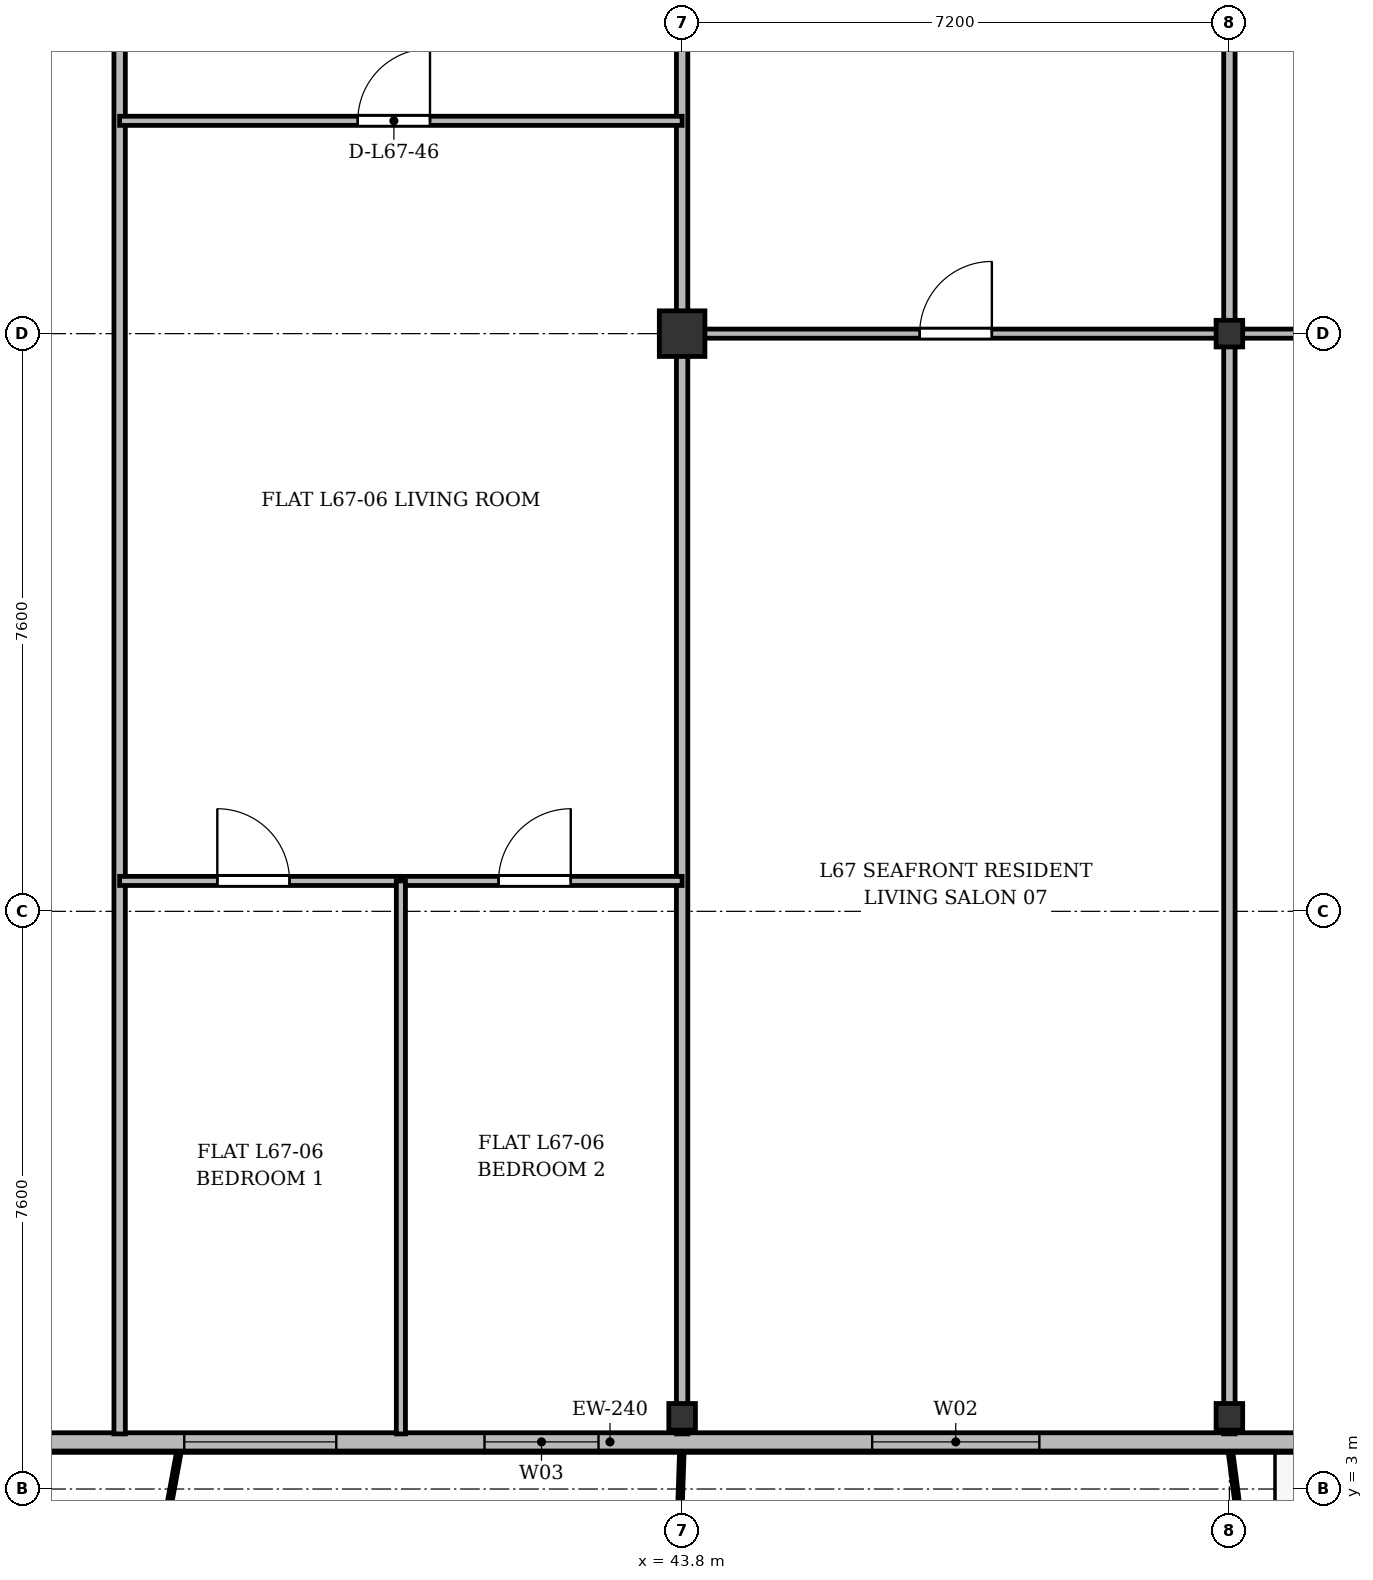
"""IFC4 building model, lengths in metres.
Left out: names, types, materials, properties, quantities, classifications, styles, units other than length and angle.
Written with IfcOpenShell. Run it as: python <this file> out.ifc"""

import sys

from ifc_helpers import new_model, si_unit, direction, frame, frame_2d, origin, origin_2d, place, context, subcontext, project, spatial, rectangle, i_section, extrude, source, transform, mapped, element, fill, save


model = new_model("IFC4")
c1 = context("Model", 3, precision=1e-05, world=origin(), true_north=direction((0.0, 1.0)))
c2 = subcontext(c1, "Body", "Model", "MODEL_VIEW")
j1 = project(units=[si_unit("LENGTHUNIT", "METRE"), si_unit("PLANEANGLEUNIT", "RADIAN")], contexts=[c1])
p1 = place(None, origin())
s1 = spatial("IfcSite", under=j1, at=p1, CompositionType="ELEMENT")
p2 = place(p1, origin())
s2 = spatial("IfcBuilding", under=s1, at=p2, CompositionType="ELEMENT")
p3 = place(p2, frame((0.0, 0.0, 259.5)))
s3 = spatial("IfcBuildingStorey", under=s2, at=p3, CompositionType="ELEMENT", Elevation=259.5)
m1 = source(origin(), c2, "Body", "SweptSolid", [
    extrude(i_section(OverallWidth=0.35, OverallDepth=0.35, WebThickness=0.018, FlangeThickness=0.028, at=origin_2d()), origin(), (0.0, 0.0, 1.0), 3.6),
])
p4 = place(p3, frame((43.8, 3.95, 0.0), z_axis=(0.0, 0.0, 1.0), x_axis=(1.0, 0.0, 0.0)))
e1 = element("IfcColumn", 1, at=p4, inside=s3, PredefinedType="COLUMN", context=c2, shape_type="MappedRepresentation", body=[
    mapped(m1, transform((0.0, 0.0, 0.0), x_axis=(1.0, 0.0, 0.0), y_axis=(0.0, 1.0, 0.0), z_axis=(0.0, 0.0, 1.0), scale=1.0)),
])
m2 = source(origin(), c2, "Body", "SweptSolid", [
    extrude(rectangle(XDim=0.6, YDim=0.6, at=origin_2d()), origin(), (0.0, 0.0, 1.0), 3.6),
])
p5 = place(p3, frame((43.8, 18.2, 0.0), z_axis=(0.0, 0.0, 1.0), x_axis=(1.0, 0.0, 0.0)))
e2 = element("IfcColumn", 2, at=p5, inside=s3, PredefinedType="COLUMN", context=c2, shape_type="MappedRepresentation", body=[
    mapped(m2, transform((0.0, 0.0, 0.0), x_axis=(1.0, 0.0, 0.0), y_axis=(0.0, 1.0, 0.0), z_axis=(0.0, 0.0, 1.0), scale=1.0)),
])
for number, where, z_axis, x_axis in (
    (3, (51.0, 3.95, 0.0), (0.0, 0.0, 1.0), (1.0, 0.0, 0.0)),
    (4, (51.0, 18.2, 0.0), (0.0, 0.0, 1.0), (1.0, 0.0, 0.0)),
):
    element("IfcColumn", number, at=place(p3, frame(where, z_axis=z_axis, x_axis=x_axis)), inside=s3, PredefinedType="COLUMN", context=c2, shape_type="MappedRepresentation", body=[
        mapped(m1, transform((0.0, 0.0, 0.0), x_axis=(1.0, 0.0, 0.0), y_axis=(0.0, 1.0, 0.0), z_axis=(0.0, 0.0, 1.0), scale=1.0)),
    ])
p6 = place(p3, frame((63.2, 3.62, 0.0), z_axis=(0.0, 0.0, 1.0), x_axis=(-1.0, 0.0, 0.0)))
e5 = element("IfcWall", 5, at=p6, inside=s3, PredefinedType="SOLIDWALL", context=c2, shape_type="SweptSolid", body=[
    extrude(rectangle(XDim=52.0, YDim=0.24, at=frame_2d((26.0, 0.0))), origin(), (0.0, 0.0, 1.0), 3.37),
])
p7 = place(p6, frame((0.345, 0.0, 0.9)))
e6 = element("IfcOpeningElement", 6, at=p7, cuts=e5, PredefinedType="OPENING", context=c2, shape_type="SweptSolid", body=[
    extrude(rectangle(XDim=1.2, YDim=1.65, at=frame_2d((0.6, 0.825))), frame((0.0, 0.13, 0.0), z_axis=(0.0, -1.0, 0.0), x_axis=(1.0, 0.0, 0.0)), (0.0, 0.0, 1.0), 0.26),
])
p8 = place(p6, frame((2.05, 0.0, 0.9)))
e7 = element("IfcOpeningElement", 7, at=p8, cuts=e5, PredefinedType="OPENING", context=c2, shape_type="SweptSolid", body=[
    extrude(rectangle(XDim=2.0, YDim=1.95, at=frame_2d((1.0, 0.975))), frame((0.0, 0.13, 0.0), z_axis=(0.0, -1.0, 0.0), x_axis=(1.0, 0.0, 0.0)), (0.0, 0.0, 1.0), 0.26),
])
p9 = place(p6, frame((5.42, 0.0, 0.0)))
e8 = element("IfcOpeningElement", 8, at=p9, cuts=e5, PredefinedType="OPENING", context=c2, shape_type="SweptSolid", body=[
    extrude(rectangle(XDim=1.2, YDim=2.2, at=frame_2d((0.6, 1.1))), frame((0.0, 0.13, 0.0), z_axis=(0.0, -1.0, 0.0), x_axis=(1.0, 0.0, 0.0)), (0.0, 0.0, 1.0), 0.26),
])
p10 = place(p6, frame((8.6, 0.0, 0.9)))
e9 = element("IfcOpeningElement", 9, at=p10, cuts=e5, PredefinedType="OPENING", context=c2, shape_type="SweptSolid", body=[
    extrude(rectangle(XDim=1.8, YDim=1.8, at=frame_2d((0.9, 0.9))), frame((0.0, 0.13, 0.0), z_axis=(0.0, -1.0, 0.0), x_axis=(1.0, 0.0, 0.0)), (0.0, 0.0, 1.0), 0.26),
])
p11 = place(p6, frame((14.7, 0.0, 0.9)))
e10 = element("IfcOpeningElement", 10, at=p11, cuts=e5, PredefinedType="OPENING", context=c2, shape_type="SweptSolid", body=[
    extrude(rectangle(XDim=2.2, YDim=1.8, at=frame_2d((1.1, 0.9))), frame((0.0, 0.13, 0.0), z_axis=(0.0, -1.0, 0.0), x_axis=(1.0, 0.0, 0.0)), (0.0, 0.0, 1.0), 0.26),
])
p12 = place(p6, frame((20.5, 0.0, 0.9)))
e11 = element("IfcOpeningElement", 11, at=p12, cuts=e5, PredefinedType="OPENING", context=c2, shape_type="SweptSolid", body=[
    extrude(rectangle(XDim=1.5, YDim=1.75, at=frame_2d((0.75, 0.875))), frame((0.0, 0.13, 0.0), z_axis=(0.0, -1.0, 0.0), x_axis=(1.0, 0.0, 0.0)), (0.0, 0.0, 1.0), 0.26),
])
p13 = place(p6, frame((23.95, 0.0, 0.9)))
e12 = element("IfcOpeningElement", 12, at=p13, cuts=e5, PredefinedType="OPENING", context=c2, shape_type="SweptSolid", body=[
    extrude(rectangle(XDim=2.0, YDim=1.95, at=frame_2d((1.0, 0.975))), frame((0.0, 0.13, 0.0), z_axis=(0.0, -1.0, 0.0), x_axis=(1.0, 0.0, 0.0)), (0.0, 0.0, 1.0), 0.26),
])
p14 = place(p6, frame((28.875, 0.0, 0.9)))
e13 = element("IfcOpeningElement", 13, at=p14, cuts=e5, PredefinedType="OPENING", context=c2, shape_type="SweptSolid", body=[
    extrude(rectangle(XDim=1.65, YDim=1.85, at=frame_2d((0.825, 0.925))), frame((0.0, 0.13, 0.0), z_axis=(0.0, -1.0, 0.0), x_axis=(1.0, 0.0, 0.0)), (0.0, 0.0, 1.0), 0.26),
])
p15 = place(p6, frame((34.078, 0.0, 0.0)))
e14 = element("IfcOpeningElement", 14, at=p15, cuts=e5, PredefinedType="OPENING", context=c2, shape_type="SweptSolid", body=[
    extrude(rectangle(XDim=1.2, YDim=2.2, at=frame_2d((0.6, 1.1))), frame((0.0, 0.13, 0.0), z_axis=(0.0, -1.0, 0.0), x_axis=(1.0, 0.0, 0.0)), (0.0, 0.0, 1.0), 0.26),
])
p16 = place(p6, frame((36.9, 0.0, 0.9)))
e15 = element("IfcOpeningElement", 15, at=p16, cuts=e5, PredefinedType="OPENING", context=c2, shape_type="SweptSolid", body=[
    extrude(rectangle(XDim=2.2, YDim=1.8, at=frame_2d((1.1, 0.9))), frame((0.0, 0.13, 0.0), z_axis=(0.0, -1.0, 0.0), x_axis=(1.0, 0.0, 0.0)), (0.0, 0.0, 1.0), 0.26),
])
p17 = place(p6, frame((41.15, 0.0, 0.9)))
e16 = element("IfcOpeningElement", 16, at=p17, cuts=e5, PredefinedType="OPENING", context=c2, shape_type="SweptSolid", body=[
    extrude(rectangle(XDim=1.5, YDim=1.75, at=frame_2d((0.75, 0.875))), frame((0.0, 0.13, 0.0), z_axis=(0.0, -1.0, 0.0), x_axis=(1.0, 0.0, 0.0)), (0.0, 0.0, 1.0), 0.26),
])
p18 = place(p6, frame((44.19, 0.0, 0.9)))
e17 = element("IfcOpeningElement", 17, at=p18, cuts=e5, PredefinedType="OPENING", context=c2, shape_type="SweptSolid", body=[
    extrude(rectangle(XDim=2.0, YDim=1.95, at=frame_2d((1.0, 0.975))), frame((0.0, 0.13, 0.0), z_axis=(0.0, -1.0, 0.0), x_axis=(1.0, 0.0, 0.0)), (0.0, 0.0, 1.0), 0.26),
])
p19 = place(p6, frame((49.93, 0.0, 0.9)))
e18 = element("IfcOpeningElement", 18, at=p19, cuts=e5, PredefinedType="OPENING", context=c2, shape_type="SweptSolid", body=[
    extrude(rectangle(XDim=1.65, YDim=1.85, at=frame_2d((0.825, 0.925))), frame((0.0, 0.13, 0.0), z_axis=(0.0, -1.0, 0.0), x_axis=(1.0, 0.0, 0.0)), (0.0, 0.0, 1.0), 0.26),
])
p20 = place(p3, frame((36.4, 3.725, 0.0), z_axis=(0.0, 0.0, 1.0), x_axis=(0.0, 1.0, 0.0)))
e19 = element("IfcWall", 19, at=p20, inside=s3, PredefinedType="PARTITIONING", context=c2, shape_type="SweptSolid", body=[
    extrude(rectangle(XDim=27.275, YDim=0.15, at=frame_2d((13.637, 0.0))), origin(), (0.0, 0.0, 1.0), 2.92),
])
for number, where, z_axis, x_axis in (
    (20, (43.8, 3.725, 0.0), (0.0, 0.0, 1.0), (0.0, 1.0, 0.0)),
    (21, (51.0, 3.725, 0.0), (0.0, 0.0, 1.0), (0.0, 1.0, 0.0)),
):
    element("IfcWall", number, at=place(p3, frame(where, z_axis=z_axis, x_axis=x_axis)), inside=s3, PredefinedType="PARTITIONING", context=c2, shape_type="SweptSolid", body=[
        extrude(rectangle(XDim=27.275, YDim=0.15, at=frame_2d((13.637, 0.0))), origin(), (0.0, 0.0, 1.0), 2.87),
    ])
p21 = place(p3, frame((36.4, 21.0, 0.0), z_axis=(0.0, 0.0, 1.0), x_axis=(1.0, 0.0, 0.0)))
e22 = element("IfcWall", 22, at=p21, inside=s3, PredefinedType="PARTITIONING", context=c2, shape_type="SweptSolid", body=[
    extrude(rectangle(XDim=7.4, YDim=0.12, at=frame_2d((3.7, 0.0))), origin(), (0.0, 0.0, 1.0), 2.87),
])
p22 = place(p21, frame((3.133, 0.0, 0.0)))
e23 = element("IfcOpeningElement", 23, at=p22, cuts=e22, PredefinedType="OPENING", context=c2, shape_type="SweptSolid", body=[
    extrude(rectangle(XDim=0.95, YDim=2.15, at=frame_2d((0.475, 1.075))), frame((0.0, 0.07, 0.0), z_axis=(0.0, -1.0, 0.0), x_axis=(1.0, 0.0, 0.0)), (0.0, 0.0, 1.0), 0.14),
])
p23 = place(p3, frame((36.4, 11.0, 0.0), z_axis=(0.0, 0.0, 1.0), x_axis=(1.0, 0.0, 0.0)))
e24 = element("IfcWall", 24, at=p23, inside=s3, PredefinedType="PARTITIONING", context=c2, shape_type="SweptSolid", body=[
    extrude(rectangle(XDim=3.7, YDim=0.12, at=frame_2d((1.85, 0.0))), origin(), (0.0, 0.0, 1.0), 3.37),
])
p24 = place(p23, frame((1.285, 0.0, 0.0)))
e25 = element("IfcOpeningElement", 25, at=p24, cuts=e24, PredefinedType="OPENING", context=c2, shape_type="SweptSolid", body=[
    extrude(rectangle(XDim=0.95, YDim=2.15, at=frame_2d((0.475, 1.075))), frame((0.0, 0.07, 0.0), z_axis=(0.0, -1.0, 0.0), x_axis=(1.0, 0.0, 0.0)), (0.0, 0.0, 1.0), 0.14),
])
p25 = place(p3, frame((40.1, 11.0, 0.0), z_axis=(0.0, 0.0, 1.0), x_axis=(1.0, 0.0, 0.0)))
e26 = element("IfcWall", 26, at=p25, inside=s3, PredefinedType="PARTITIONING", context=c2, shape_type="SweptSolid", body=[
    extrude(rectangle(XDim=3.7, YDim=0.12, at=frame_2d((1.85, 0.0))), origin(), (0.0, 0.0, 1.0), 2.87),
])
p26 = place(p25, frame((1.285, 0.0, 0.0)))
e27 = element("IfcOpeningElement", 27, at=p26, cuts=e26, PredefinedType="OPENING", context=c2, shape_type="SweptSolid", body=[
    extrude(rectangle(XDim=0.95, YDim=2.15, at=frame_2d((0.475, 1.075))), frame((0.0, 0.07, 0.0), z_axis=(0.0, -1.0, 0.0), x_axis=(1.0, 0.0, 0.0)), (0.0, 0.0, 1.0), 0.14),
])
p27 = place(p3, frame((40.1, 3.725, 0.0), z_axis=(0.0, 0.0, 1.0), x_axis=(0.0, 1.0, 0.0)))
e28 = element("IfcWall", 28, at=p27, inside=s3, PredefinedType="PARTITIONING", context=c2, shape_type="SweptSolid", body=[
    extrude(rectangle(XDim=7.275, YDim=0.12, at=frame_2d((3.637, 0.0))), origin(), (0.0, 0.0, 1.0), 2.92),
])
p28 = place(p3, frame((43.8, 18.2, 0.0), z_axis=(0.0, 0.0, 1.0), x_axis=(1.0, 0.0, 0.0)))
e29 = element("IfcWall", 29, at=p28, inside=s3, PredefinedType="PARTITIONING", context=c2, shape_type="SweptSolid", body=[
    extrude(rectangle(XDim=7.2, YDim=0.12, at=frame_2d((3.6, 0.0))), origin(), (0.0, 0.0, 1.0), 2.92),
])
p29 = place(p28, frame((3.125, 0.0, 0.0)))
e30 = element("IfcOpeningElement", 30, at=p29, cuts=e29, PredefinedType="OPENING", context=c2, shape_type="SweptSolid", body=[
    extrude(rectangle(XDim=0.95, YDim=2.15, at=frame_2d((0.475, 1.075))), frame((0.0, 0.07, 0.0), z_axis=(0.0, -1.0, 0.0), x_axis=(1.0, 0.0, 0.0)), (0.0, 0.0, 1.0), 0.14),
])
p30 = place(p3, frame((51.0, 18.2, 0.0), z_axis=(0.0, 0.0, 1.0), x_axis=(1.0, 0.0, 0.0)))
e31 = element("IfcWall", 31, at=p30, inside=s3, PredefinedType="PARTITIONING", context=c2, shape_type="SweptSolid", body=[
    extrude(rectangle(XDim=5.4, YDim=0.12, at=frame_2d((2.7, 0.0))), origin(), (0.0, 0.0, 1.0), 2.92),
])
p31 = place(p30, frame((2.225, 0.0, 0.0)))
e32 = element("IfcOpeningElement", 32, at=p31, cuts=e31, PredefinedType="OPENING", context=c2, shape_type="SweptSolid", body=[
    extrude(rectangle(XDim=0.95, YDim=2.15, at=frame_2d((0.475, 1.075))), frame((0.0, 0.07, 0.0), z_axis=(0.0, -1.0, 0.0), x_axis=(1.0, 0.0, 0.0)), (0.0, 0.0, 1.0), 0.14),
])
m3 = source(origin(), c2, "Body", "SweptSolid", [
    extrude(rectangle(XDim=2.2, YDim=1.8, at=frame_2d((1.1, 0.9))), frame((0.0, 0.03, 0.0), z_axis=(0.0, -1.0, 0.0), x_axis=(1.0, 0.0, 0.0)), (0.0, 0.0, 1.0), 0.06),
])
p32 = place(p11, origin())
e33 = element("IfcWindow", 33, at=p32, inside=s3, PartitioningType="SINGLE_PANEL", PredefinedType="WINDOW", context=c2, shape_type="MappedRepresentation", body=[
    mapped(m3, transform((0.0, 0.0, 0.0), x_axis=(1.0, 0.0, 0.0), y_axis=(0.0, 1.0, 0.0), z_axis=(0.0, 0.0, 1.0), scale=1.0)),
])
fill(e10, e33)
m4 = source(origin(), c2, "Body", "SweptSolid", [
    extrude(rectangle(XDim=1.5, YDim=1.75, at=frame_2d((0.75, 0.875))), frame((0.0, 0.03, 0.0), z_axis=(0.0, -1.0, 0.0), x_axis=(1.0, 0.0, 0.0)), (0.0, 0.0, 1.0), 0.06),
])
p33 = place(p12, origin())
e34 = element("IfcWindow", 34, at=p33, inside=s3, PartitioningType="SINGLE_PANEL", PredefinedType="WINDOW", context=c2, shape_type="MappedRepresentation", body=[
    mapped(m4, transform((0.0, 0.0, 0.0), x_axis=(1.0, 0.0, 0.0), y_axis=(0.0, 1.0, 0.0), z_axis=(0.0, 0.0, 1.0), scale=1.0)),
])
fill(e11, e34)
m5 = source(origin(), c2, "Body", "SweptSolid", [
    extrude(rectangle(XDim=2.0, YDim=1.95, at=frame_2d((1.0, 0.975))), frame((0.0, 0.03, 0.0), z_axis=(0.0, -1.0, 0.0), x_axis=(1.0, 0.0, 0.0)), (0.0, 0.0, 1.0), 0.06),
])
p34 = place(p13, origin())
e35 = element("IfcWindow", 35, at=p34, inside=s3, PartitioningType="SINGLE_PANEL", PredefinedType="WINDOW", context=c2, shape_type="MappedRepresentation", body=[
    mapped(m5, transform((0.0, 0.0, 0.0), x_axis=(1.0, 0.0, 0.0), y_axis=(0.0, 1.0, 0.0), z_axis=(0.0, 0.0, 1.0), scale=1.0)),
])
fill(e12, e35)
m6 = source(origin(), c2, "Body", "SweptSolid", [
    extrude(rectangle(XDim=0.95, YDim=2.15, at=frame_2d((0.475, 1.075))), frame((0.0, 0.025, 0.0), z_axis=(0.0, -1.0, 0.0), x_axis=(1.0, 0.0, 0.0)), (0.0, 0.0, 1.0), 0.05),
])
p35 = place(p22, origin())
e36 = element("IfcDoor", 36, at=p35, inside=s3, OperationType="SINGLE_SWING_RIGHT", PredefinedType="DOOR", context=c2, shape_type="MappedRepresentation", body=[
    mapped(m6, transform((0.0, 0.0, 0.0), x_axis=(1.0, 0.0, 0.0), y_axis=(0.0, 1.0, 0.0), z_axis=(0.0, 0.0, 1.0), scale=1.0)),
])
fill(e23, e36)
p36 = place(p24, origin())
e37 = element("IfcDoor", 37, at=p36, inside=s3, OperationType="SINGLE_SWING_LEFT", PredefinedType="DOOR", context=c2, shape_type="MappedRepresentation", body=[
    mapped(m6, transform((0.0, 0.0, 0.0), x_axis=(1.0, 0.0, 0.0), y_axis=(0.0, 1.0, 0.0), z_axis=(0.0, 0.0, 1.0), scale=1.0)),
])
fill(e25, e37)
p37 = place(p26, origin())
e38 = element("IfcDoor", 38, at=p37, inside=s3, OperationType="SINGLE_SWING_RIGHT", PredefinedType="DOOR", context=c2, shape_type="MappedRepresentation", body=[
    mapped(m6, transform((0.0, 0.0, 0.0), x_axis=(1.0, 0.0, 0.0), y_axis=(0.0, 1.0, 0.0), z_axis=(0.0, 0.0, 1.0), scale=1.0)),
])
fill(e27, e38)
p38 = place(p29, origin())
e39 = element("IfcDoor", 39, at=p38, inside=s3, OperationType="SINGLE_SWING_RIGHT", PredefinedType="DOOR", context=c2, shape_type="MappedRepresentation", body=[
    mapped(m6, transform((0.0, 0.0, 0.0), x_axis=(1.0, 0.0, 0.0), y_axis=(0.0, 1.0, 0.0), z_axis=(0.0, 0.0, 1.0), scale=1.0)),
])
fill(e30, e39)
save(model, sys.argv[1])
